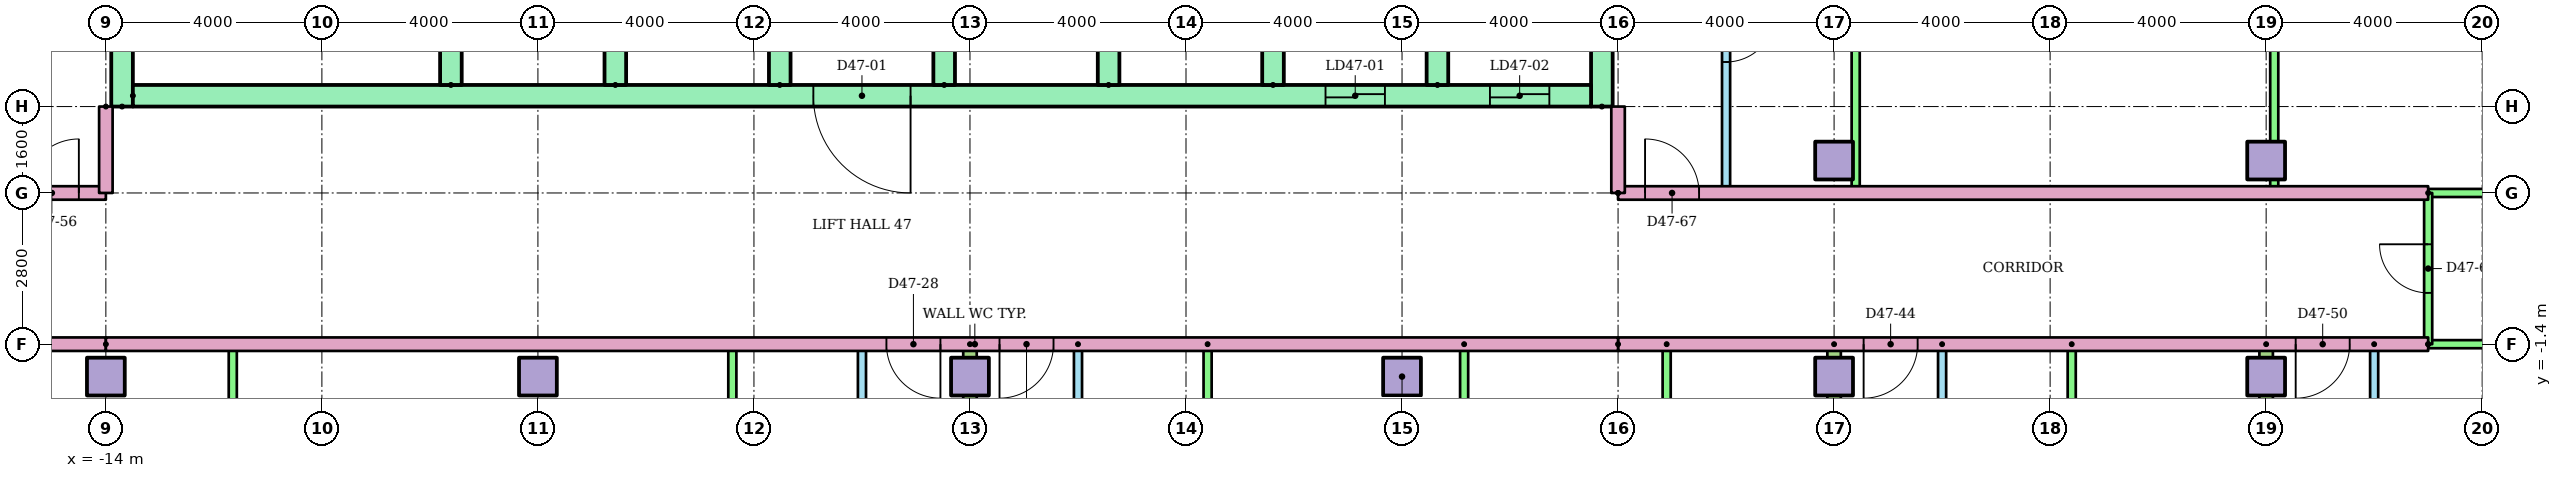
"""IFC4 building model, lengths in metres.
Left out: names, types, materials, properties, quantities, classifications, styles, units other than length and angle.
Written with IfcOpenShell. Run it as: python <this file> out.ifc"""

import sys

from ifc_helpers import new_model, si_unit, direction, frame, frame_2d, origin, origin_2d, place, context, subcontext, project, spatial, rectangle, extrude, element, fill, save


model = new_model("IFC4")
c1 = context("Model", 3, precision=1e-05, world=origin(), true_north=direction((0.0, 1.0)))
c2 = subcontext(c1, "Body", "Model", "MODEL_VIEW")
j1 = project(units=[si_unit("LENGTHUNIT", "METRE"), si_unit("PLANEANGLEUNIT", "RADIAN")], contexts=[c1])
p1 = place(None, origin())
s1 = spatial("IfcSite", under=j1, at=p1, CompositionType="ELEMENT")
p2 = place(p1, origin())
s2 = spatial("IfcBuilding", under=s1, at=p2, CompositionType="ELEMENT")
p3 = place(p2, frame((0.0, 0.0, 181.3)))
s3 = spatial("IfcBuildingStorey", under=s2, at=p3, CompositionType="ELEMENT", Elevation=181.3)
for number, where in (
    (1, (-14.0, -2.0, 0.0)),
    (2, (-6.0, -2.0, 0.0)),
    (3, (2.0, -2.0, 0.0)),
    (4, (10.0, -2.0, 0.0)),
    (5, (18.0, -2.0, 0.0)),
    (6, (26.0, -2.0, 0.0)),
    (7, (18.0, 2.0, 0.0)),
    (8, (26.0, 2.0, 0.0)),
):
    element("IfcColumn", number, at=place(p3, frame(where)), inside=s3, PredefinedType="COLUMN", context=c2, shape_type="SweptSolid", body=[
        extrude(rectangle(XDim=0.7, YDim=0.7, at=origin_2d()), origin(), (0.0, 0.0, 1.0), 3.2),
    ])
for number, where, z_axis, x_axis in (
    (9, (-13.7, 3.0, 0.0), (0.0, 0.0, 1.0), (0.0, 1.0, 0.0)),
    (10, (13.7, 3.0, 0.0), (0.0, 0.0, 1.0), (0.0, 1.0, 0.0)),
):
    element("IfcWall", number, at=place(p3, frame(where, z_axis=z_axis, x_axis=x_axis)), inside=s3, PredefinedType="SHEAR", context=c2, shape_type="SweptSolid", body=[
        extrude(rectangle(XDim=17.0, YDim=0.4, at=frame_2d((8.5, 0.0))), origin(), (0.0, 0.0, 1.0), 2.92),
    ])
p4 = place(p3, frame((-13.5, 3.2, 0.0)))
e11 = element("IfcWall", 11, at=p4, inside=s3, PredefinedType="SHEAR", context=c2, shape_type="SweptSolid", body=[
    extrude(rectangle(XDim=27.0, YDim=0.4, at=frame_2d((13.5, 0.0))), origin(), (0.0, 0.0, 1.0), 2.92),
])
p5 = place(p4, frame((22.083, 0.0, 0.0)))
e12 = element("IfcOpeningElement", 12, at=p5, cuts=e11, PredefinedType="OPENING", context=c2, shape_type="SweptSolid", body=[
    extrude(rectangle(XDim=1.1, YDim=2.1, at=frame_2d((0.55, 1.05))), frame((0.0, 0.21, 0.0), z_axis=(0.0, -1.0, 0.0), x_axis=(1.0, 0.0, 0.0)), (0.0, 0.0, 1.0), 0.42),
])
p6 = place(p4, frame((25.128, 0.0, 0.0)))
e13 = element("IfcOpeningElement", 13, at=p6, cuts=e11, PredefinedType="OPENING", context=c2, shape_type="SweptSolid", body=[
    extrude(rectangle(XDim=1.1, YDim=2.1, at=frame_2d((0.55, 1.05))), frame((0.0, 0.21, 0.0), z_axis=(0.0, -1.0, 0.0), x_axis=(1.0, 0.0, 0.0)), (0.0, 0.0, 1.0), 0.42),
])
p7 = place(p4, frame((12.6, 0.0, 0.0)))
e14 = element("IfcOpeningElement", 14, at=p7, cuts=e11, PredefinedType="OPENING", context=c2, shape_type="SweptSolid", body=[
    extrude(rectangle(XDim=1.8, YDim=2.1, at=frame_2d((0.9, 1.05))), frame((0.0, 0.21, 0.0), z_axis=(0.0, -1.0, 0.0), x_axis=(1.0, 0.0, 0.0)), (0.0, 0.0, 1.0), 0.42),
])
for number, where, z_axis, x_axis in (
    (15, (-7.611, 3.4, 0.0), (0.0, 0.0, 1.0), (0.0, 1.0, 0.0)),
    (16, (-4.567, 3.4, 0.0), (0.0, 0.0, 1.0), (0.0, 1.0, 0.0)),
    (17, (-1.522, 3.4, 0.0), (0.0, 0.0, 1.0), (0.0, 1.0, 0.0)),
    (18, (1.522, 3.4, 0.0), (0.0, 0.0, 1.0), (0.0, 1.0, 0.0)),
    (19, (4.567, 3.4, 0.0), (0.0, 0.0, 1.0), (0.0, 1.0, 0.0)),
    (20, (7.611, 3.4, 0.0), (0.0, 0.0, 1.0), (0.0, 1.0, 0.0)),
    (21, (10.656, 3.4, 0.0), (0.0, 0.0, 1.0), (0.0, 1.0, 0.0)),
):
    element("IfcWall", number, at=place(p3, frame(where, z_axis=z_axis, x_axis=x_axis)), inside=s3, PredefinedType="SHEAR", context=c2, shape_type="SweptSolid", body=[
        extrude(rectangle(XDim=3.0, YDim=0.4, at=frame_2d((1.5, 0.0))), origin(), (0.0, 0.0, 1.0), 2.92),
    ])
p8 = place(p3, frame((0.0, -9.3, 0.0), z_axis=(0.0, 0.0, 1.0), x_axis=(0.0, 1.0, 0.0)))
e22 = element("IfcWall", 22, at=p8, inside=s3, PredefinedType="PARTITIONING", context=c2, shape_type="SweptSolid", body=[
    extrude(rectangle(XDim=7.9, YDim=0.15, at=frame_2d((3.95, 0.0))), origin(), (0.0, 0.0, 1.0), 2.4),
])
p9 = place(p8, frame((5.325, 0.0, 0.0)))
e23 = element("IfcOpeningElement", 23, at=p9, cuts=e22, PredefinedType="OPENING", context=c2, shape_type="SweptSolid", body=[
    extrude(rectangle(XDim=0.9, YDim=2.1, at=frame_2d((0.45, 1.05))), frame((0.0, 0.085, 0.0), z_axis=(0.0, -1.0, 0.0), x_axis=(1.0, 0.0, 0.0)), (0.0, 0.0, 1.0), 0.17),
])
p10 = place(p8, frame((1.425, 0.0, 0.0)))
e24 = element("IfcOpeningElement", 24, at=p10, cuts=e22, PredefinedType="OPENING", context=c2, shape_type="SweptSolid", body=[
    extrude(rectangle(XDim=0.8, YDim=2.1, at=frame_2d((0.4, 1.05))), frame((0.0, 0.085, 0.0), z_axis=(0.0, -1.0, 0.0), x_axis=(1.0, 0.0, 0.0)), (0.0, 0.0, 1.0), 0.17),
])
for number, where, z_axis, x_axis in (
    (25, (-2.4, -9.3, 0.0), (0.0, 0.0, 1.0), (0.0, 1.0, 0.0)),
    (26, (-11.65, -9.3, 0.0), (0.0, 0.0, 1.0), (0.0, 1.0, 0.0)),
):
    element("IfcWall", number, at=place(p3, frame(where, z_axis=z_axis, x_axis=x_axis)), inside=s3, PredefinedType="PARTITIONING", context=c2, shape_type="SweptSolid", body=[
        extrude(rectangle(XDim=7.9, YDim=0.15, at=frame_2d((3.95, 0.0))), origin(), (0.0, 0.0, 1.0), 2.4),
    ])
p11 = place(p3, frame((4.0, -1.4, 0.0), z_axis=(0.0, 0.0, 1.0), x_axis=(0.0, -1.0, 0.0)))
e27 = element("IfcWall", 27, at=p11, inside=s3, PredefinedType="PARTITIONING", context=c2, shape_type="SweptSolid", body=[
    extrude(rectangle(XDim=7.9, YDim=0.15, at=frame_2d((3.95, 0.0))), origin(), (0.0, 0.0, 1.0), 2.4),
])
p12 = place(p11, frame((1.675, 0.0, 0.0)))
e28 = element("IfcOpeningElement", 28, at=p12, cuts=e27, PredefinedType="OPENING", context=c2, shape_type="SweptSolid", body=[
    extrude(rectangle(XDim=0.9, YDim=2.1, at=frame_2d((0.45, 1.05))), frame((0.0, 0.085, 0.0), z_axis=(0.0, -1.0, 0.0), x_axis=(1.0, 0.0, 0.0)), (0.0, 0.0, 1.0), 0.17),
])
p13 = place(p11, frame((5.675, 0.0, 0.0)))
e29 = element("IfcOpeningElement", 29, at=p13, cuts=e27, PredefinedType="OPENING", context=c2, shape_type="SweptSolid", body=[
    extrude(rectangle(XDim=0.8, YDim=2.1, at=frame_2d((0.4, 1.05))), frame((0.0, 0.085, 0.0), z_axis=(0.0, -1.0, 0.0), x_axis=(1.0, 0.0, 0.0)), (0.0, 0.0, 1.0), 0.17),
])
for number, where, z_axis, x_axis in (
    (30, (6.4, -1.4, 0.0), (0.0, 0.0, 1.0), (0.0, -1.0, 0.0)),
    (31, (11.15, -1.4, 0.0), (0.0, 0.0, 1.0), (0.0, -1.0, 0.0)),
    (32, (14.9, -1.4, 0.0), (0.0, 0.0, 1.0), (0.0, -1.0, 0.0)),
):
    element("IfcWall", number, at=place(p3, frame(where, z_axis=z_axis, x_axis=x_axis)), inside=s3, PredefinedType="PARTITIONING", context=c2, shape_type="SweptSolid", body=[
        extrude(rectangle(XDim=7.9, YDim=0.15, at=frame_2d((3.95, 0.0))), origin(), (0.0, 0.0, 1.0), 2.4),
    ])
p14 = place(p3, frame((2.0, -1.4, 0.0), z_axis=(0.0, 0.0, 1.0), x_axis=(0.0, -1.0, 0.0)))
e33 = element("IfcWall", 33, at=p14, inside=s3, PredefinedType="PARTITIONING", context=c2, shape_type="SweptSolid", body=[
    extrude(rectangle(XDim=15.01, YDim=0.25, at=frame_2d((7.505, 0.0))), origin(), (0.0, 0.0, 1.0), 2.4),
])
p15 = place(p3, frame((20.0, -1.4, 0.0), z_axis=(0.0, 0.0, 1.0), x_axis=(0.0, -1.0, 0.0)))
e34 = element("IfcWall", 34, at=p15, inside=s3, PredefinedType="PARTITIONING", context=c2, shape_type="SweptSolid", body=[
    extrude(rectangle(XDim=7.9, YDim=0.15, at=frame_2d((3.95, 0.0))), origin(), (0.0, 0.0, 1.0), 2.4),
])
p16 = place(p15, frame((1.675, 0.0, 0.0)))
e35 = element("IfcOpeningElement", 35, at=p16, cuts=e34, PredefinedType="OPENING", context=c2, shape_type="SweptSolid", body=[
    extrude(rectangle(XDim=0.9, YDim=2.1, at=frame_2d((0.45, 1.05))), frame((0.0, 0.085, 0.0), z_axis=(0.0, -1.0, 0.0), x_axis=(1.0, 0.0, 0.0)), (0.0, 0.0, 1.0), 0.17),
])
p17 = place(p15, frame((5.675, 0.0, 0.0)))
e36 = element("IfcOpeningElement", 36, at=p17, cuts=e34, PredefinedType="OPENING", context=c2, shape_type="SweptSolid", body=[
    extrude(rectangle(XDim=0.8, YDim=2.1, at=frame_2d((0.4, 1.05))), frame((0.0, 0.085, 0.0), z_axis=(0.0, -1.0, 0.0), x_axis=(1.0, 0.0, 0.0)), (0.0, 0.0, 1.0), 0.17),
])
p18 = place(p3, frame((22.4, -1.4, 0.0), z_axis=(0.0, 0.0, 1.0), x_axis=(0.0, -1.0, 0.0)))
e37 = element("IfcWall", 37, at=p18, inside=s3, PredefinedType="PARTITIONING", context=c2, shape_type="SweptSolid", body=[
    extrude(rectangle(XDim=7.9, YDim=0.15, at=frame_2d((3.95, 0.0))), origin(), (0.0, 0.0, 1.0), 2.4),
])
p19 = place(p3, frame((18.0, -1.4, 0.0), z_axis=(0.0, 0.0, 1.0), x_axis=(0.0, -1.0, 0.0)))
e38 = element("IfcWall", 38, at=p19, inside=s3, PredefinedType="PARTITIONING", context=c2, shape_type="SweptSolid", body=[
    extrude(rectangle(XDim=15.01, YDim=0.25, at=frame_2d((7.505, 0.0))), origin(), (0.0, 0.0, 1.0), 2.4),
])
p20 = place(p3, frame((28.0, -1.4, 0.0), z_axis=(0.0, 0.0, 1.0), x_axis=(0.0, -1.0, 0.0)))
e39 = element("IfcWall", 39, at=p20, inside=s3, PredefinedType="PARTITIONING", context=c2, shape_type="SweptSolid", body=[
    extrude(rectangle(XDim=7.9, YDim=0.15, at=frame_2d((3.95, 0.0))), origin(), (0.0, 0.0, 1.0), 2.4),
])
p21 = place(p20, frame((1.675, 0.0, 0.0)))
e40 = element("IfcOpeningElement", 40, at=p21, cuts=e39, PredefinedType="OPENING", context=c2, shape_type="SweptSolid", body=[
    extrude(rectangle(XDim=0.9, YDim=2.1, at=frame_2d((0.45, 1.05))), frame((0.0, 0.085, 0.0), z_axis=(0.0, -1.0, 0.0), x_axis=(1.0, 0.0, 0.0)), (0.0, 0.0, 1.0), 0.17),
])
p22 = place(p20, frame((5.675, 0.0, 0.0)))
e41 = element("IfcOpeningElement", 41, at=p22, cuts=e39, PredefinedType="OPENING", context=c2, shape_type="SweptSolid", body=[
    extrude(rectangle(XDim=0.8, YDim=2.1, at=frame_2d((0.4, 1.05))), frame((0.0, 0.085, 0.0), z_axis=(0.0, -1.0, 0.0), x_axis=(1.0, 0.0, 0.0)), (0.0, 0.0, 1.0), 0.17),
])
p23 = place(p3, frame((26.0, -1.4, 0.0), z_axis=(0.0, 0.0, 1.0), x_axis=(0.0, -1.0, 0.0)))
e42 = element("IfcWall", 42, at=p23, inside=s3, PredefinedType="PARTITIONING", context=c2, shape_type="SweptSolid", body=[
    extrude(rectangle(XDim=15.01, YDim=0.25, at=frame_2d((7.505, 0.0))), origin(), (0.0, 0.0, 1.0), 2.4),
])
p24 = place(p3, frame((-14.0, -1.4, 0.0), z_axis=(0.0, 0.0, 1.0), x_axis=(-1.0, 0.0, 0.0)))
e43 = element("IfcWall", 43, at=p24, inside=s3, PredefinedType="PARTITIONING", context=c2, shape_type="SweptSolid", body=[
    extrude(rectangle(XDim=10.82, YDim=0.25, at=frame_2d((5.41, 0.0))), origin(), (0.0, 0.0, 1.0), 2.4),
])
p25 = place(p3, frame((29.0, -1.4, 0.0), z_axis=(0.0, 0.0, 1.0), x_axis=(-1.0, 0.0, 0.0)))
e44 = element("IfcWall", 44, at=p25, inside=s3, PredefinedType="PARTITIONING", context=c2, shape_type="SweptSolid", body=[
    extrude(rectangle(XDim=15.0, YDim=0.25, at=frame_2d((7.5, 0.0))), origin(), (0.0, 0.0, 1.0), 2.4),
])
p26 = place(p25, frame((9.453, 0.0, 0.0)))
e45 = element("IfcOpeningElement", 45, at=p26, cuts=e44, PredefinedType="OPENING", context=c2, shape_type="SweptSolid", body=[
    extrude(rectangle(XDim=1.0, YDim=2.1, at=frame_2d((0.5, 1.05))), frame((0.0, 0.135, 0.0), z_axis=(0.0, -1.0, 0.0), x_axis=(1.0, 0.0, 0.0)), (0.0, 0.0, 1.0), 0.27),
])
p27 = place(p25, frame((1.453, 0.0, 0.0)))
e46 = element("IfcOpeningElement", 46, at=p27, cuts=e44, PredefinedType="OPENING", context=c2, shape_type="SweptSolid", body=[
    extrude(rectangle(XDim=1.0, YDim=2.1, at=frame_2d((0.5, 1.05))), frame((0.0, 0.135, 0.0), z_axis=(0.0, -1.0, 0.0), x_axis=(1.0, 0.0, 0.0)), (0.0, 0.0, 1.0), 0.27),
])
p28 = place(p3, frame((36.82, -1.4, 0.0), z_axis=(0.0, 0.0, 1.0), x_axis=(-1.0, 0.0, 0.0)))
e47 = element("IfcWall", 47, at=p28, inside=s3, PredefinedType="PARTITIONING", context=c2, shape_type="SweptSolid", body=[
    extrude(rectangle(XDim=7.82, YDim=0.15, at=frame_2d((3.91, 0.0))), origin(), (0.0, 0.0, 1.0), 2.4),
])
p29 = place(p3, frame((-24.82, 1.4, 0.0)))
e48 = element("IfcWall", 48, at=p29, inside=s3, PredefinedType="PARTITIONING", context=c2, shape_type="SweptSolid", body=[
    extrude(rectangle(XDim=10.82, YDim=0.25, at=frame_2d((5.41, 0.0))), origin(), (0.0, 0.0, 1.0), 2.4),
])
p30 = place(p29, frame((9.32, 0.0, 0.0)))
e49 = element("IfcOpeningElement", 49, at=p30, cuts=e48, PredefinedType="OPENING", context=c2, shape_type="SweptSolid", body=[
    extrude(rectangle(XDim=1.0, YDim=2.1, at=frame_2d((0.5, 1.05))), frame((0.0, 0.135, 0.0), z_axis=(0.0, -1.0, 0.0), x_axis=(1.0, 0.0, 0.0)), (0.0, 0.0, 1.0), 0.27),
])
p31 = place(p3, frame((16.0, 11.7, 0.0), z_axis=(0.0, 0.0, 1.0), x_axis=(0.0, -1.0, 0.0)))
e50 = element("IfcWall", 50, at=p31, inside=s3, PredefinedType="PARTITIONING", context=c2, shape_type="SweptSolid", body=[
    extrude(rectangle(XDim=10.3, YDim=0.15, at=frame_2d((5.15, 0.0))), origin(), (0.0, 0.0, 1.0), 2.4),
])
p32 = place(p31, frame((6.975, 0.0, 0.0)))
e51 = element("IfcOpeningElement", 51, at=p32, cuts=e50, PredefinedType="OPENING", context=c2, shape_type="SweptSolid", body=[
    extrude(rectangle(XDim=0.9, YDim=2.1, at=frame_2d((0.45, 1.05))), frame((0.0, 0.085, 0.0), z_axis=(0.0, -1.0, 0.0), x_axis=(1.0, 0.0, 0.0)), (0.0, 0.0, 1.0), 0.17),
])
p33 = place(p31, frame((1.875, 0.0, 0.0)))
e52 = element("IfcOpeningElement", 52, at=p33, cuts=e50, PredefinedType="OPENING", context=c2, shape_type="SweptSolid", body=[
    extrude(rectangle(XDim=0.8, YDim=2.1, at=frame_2d((0.4, 1.05))), frame((0.0, 0.085, 0.0), z_axis=(0.0, -1.0, 0.0), x_axis=(1.0, 0.0, 0.0)), (0.0, 0.0, 1.0), 0.17),
])
for number, where, z_axis, x_axis in (
    (53, (18.4, 11.7, 0.0), (0.0, 0.0, 1.0), (0.0, -1.0, 0.0)),
    (54, (26.15, 11.7, 0.0), (0.0, 0.0, 1.0), (0.0, -1.0, 0.0)),
):
    element("IfcWall", number, at=place(p3, frame(where, z_axis=z_axis, x_axis=x_axis)), inside=s3, PredefinedType="PARTITIONING", context=c2, shape_type="SweptSolid", body=[
        extrude(rectangle(XDim=10.3, YDim=0.15, at=frame_2d((5.15, 0.0))), origin(), (0.0, 0.0, 1.0), 2.4),
    ])
p34 = place(p3, frame((14.0, 1.4, 0.0)))
e55 = element("IfcWall", 55, at=p34, inside=s3, PredefinedType="PARTITIONING", context=c2, shape_type="SweptSolid", body=[
    extrude(rectangle(XDim=15.0, YDim=0.25, at=frame_2d((7.5, 0.0))), origin(), (0.0, 0.0, 1.0), 2.4),
])
p35 = place(p34, frame((0.5, 0.0, 0.0)))
e56 = element("IfcOpeningElement", 56, at=p35, cuts=e55, PredefinedType="OPENING", context=c2, shape_type="SweptSolid", body=[
    extrude(rectangle(XDim=1.0, YDim=2.1, at=frame_2d((0.5, 1.05))), frame((0.0, 0.135, 0.0), z_axis=(0.0, -1.0, 0.0), x_axis=(1.0, 0.0, 0.0)), (0.0, 0.0, 1.0), 0.27),
])
p36 = place(p3, frame((29.0, 1.4, 0.0)))
e57 = element("IfcWall", 57, at=p36, inside=s3, PredefinedType="PARTITIONING", context=c2, shape_type="SweptSolid", body=[
    extrude(rectangle(XDim=7.82, YDim=0.15, at=frame_2d((3.91, 0.0))), origin(), (0.0, 0.0, 1.0), 2.4),
])
p37 = place(p3, frame((29.0, -1.4, 0.0), z_axis=(0.0, 0.0, 1.0), x_axis=(0.0, 1.0, 0.0)))
e58 = element("IfcWall", 58, at=p37, inside=s3, PredefinedType="PARTITIONING", context=c2, shape_type="SweptSolid", body=[
    extrude(rectangle(XDim=2.8, YDim=0.15, at=frame_2d((1.4, 0.0))), origin(), (0.0, 0.0, 1.0), 2.4),
])
p38 = place(p37, frame((0.95, 0.0, 0.0)))
e59 = element("IfcOpeningElement", 59, at=p38, cuts=e58, PredefinedType="OPENING", context=c2, shape_type="SweptSolid", body=[
    extrude(rectangle(XDim=0.9, YDim=2.1, at=frame_2d((0.45, 1.05))), frame((0.0, 0.085, 0.0), z_axis=(0.0, -1.0, 0.0), x_axis=(1.0, 0.0, 0.0)), (0.0, 0.0, 1.0), 0.17),
])
p39 = place(p3, frame((14.0, -1.4, 0.0), z_axis=(0.0, 0.0, 1.0), x_axis=(-1.0, 0.0, 0.0)))
e60 = element("IfcWall", 60, at=p39, inside=s3, PredefinedType="PARTITIONING", context=c2, shape_type="SweptSolid", body=[
    extrude(rectangle(XDim=28.0, YDim=0.25, at=frame_2d((14.0, 0.0))), origin(), (0.0, 0.0, 1.0), 2.4),
])
p40 = place(p39, frame((12.547, 0.0, 0.0)))
e61 = element("IfcOpeningElement", 61, at=p40, cuts=e60, PredefinedType="OPENING", context=c2, shape_type="SweptSolid", body=[
    extrude(rectangle(XDim=1.0, YDim=2.1, at=frame_2d((0.5, 1.05))), frame((0.0, 0.135, 0.0), z_axis=(0.0, -1.0, 0.0), x_axis=(1.0, 0.0, 0.0)), (0.0, 0.0, 1.0), 0.27),
])
p41 = place(p39, frame((10.453, 0.0, 0.0)))
e62 = element("IfcOpeningElement", 62, at=p41, cuts=e60, PredefinedType="OPENING", context=c2, shape_type="SweptSolid", body=[
    extrude(rectangle(XDim=1.0, YDim=2.1, at=frame_2d((0.5, 1.05))), frame((0.0, 0.135, 0.0), z_axis=(0.0, -1.0, 0.0), x_axis=(1.0, 0.0, 0.0)), (0.0, 0.0, 1.0), 0.27),
])
for number, where, z_axis, x_axis in (
    (63, (-14.0, 3.0, 0.0), (0.0, 0.0, 1.0), (0.0, -1.0, 0.0)),
    (64, (14.0, 1.4, 0.0), (0.0, 0.0, 1.0), (0.0, 1.0, 0.0)),
):
    element("IfcWall", number, at=place(p3, frame(where, z_axis=z_axis, x_axis=x_axis)), inside=s3, PredefinedType="PARTITIONING", context=c2, shape_type="SweptSolid", body=[
        extrude(rectangle(XDim=1.6, YDim=0.25, at=frame_2d((0.8, 0.0))), origin(), (0.0, 0.0, 1.0), 2.4),
    ])
p42 = place(p5, origin())
e65 = element("IfcDoor", 65, at=p42, inside=s3, OperationType="SLIDING_TO_LEFT", PredefinedType="DOOR", context=c2, shape_type="SweptSolid", body=[
    extrude(rectangle(XDim=1.1, YDim=2.1, at=frame_2d((0.55, 1.05))), frame((0.0, 0.025, 0.0), z_axis=(0.0, -1.0, 0.0), x_axis=(1.0, 0.0, 0.0)), (0.0, 0.0, 1.0), 0.05),
])
fill(e12, e65)
p43 = place(p6, origin())
e66 = element("IfcDoor", 66, at=p43, inside=s3, OperationType="SLIDING_TO_LEFT", PredefinedType="DOOR", context=c2, shape_type="SweptSolid", body=[
    extrude(rectangle(XDim=1.1, YDim=2.1, at=frame_2d((0.55, 1.05))), frame((0.0, 0.025, 0.0), z_axis=(0.0, -1.0, 0.0), x_axis=(1.0, 0.0, 0.0)), (0.0, 0.0, 1.0), 0.05),
])
fill(e13, e66)
p44 = place(p7, frame((1.8, 0.0, 0.0), z_axis=(0.0, 0.0, 1.0), x_axis=(-1.0, 0.0, 0.0)))
e67 = element("IfcDoor", 67, at=p44, inside=s3, OperationType="DOUBLE_DOOR_SINGLE_SWING", PredefinedType="DOOR", context=c2, shape_type="SweptSolid", body=[
    extrude(rectangle(XDim=1.8, YDim=2.1, at=frame_2d((0.9, 1.05))), frame((0.0, 0.025, 0.0), z_axis=(0.0, -1.0, 0.0), x_axis=(1.0, 0.0, 0.0)), (0.0, 0.0, 1.0), 0.05),
])
fill(e14, e67)
p45 = place(p40, origin())
e68 = element("IfcDoor", 68, at=p45, inside=s3, OperationType="SINGLE_SWING_LEFT", PredefinedType="DOOR", context=c2, shape_type="SweptSolid", body=[
    extrude(rectangle(XDim=1.0, YDim=2.1, at=frame_2d((0.5, 1.05))), frame((0.0, 0.025, 0.0), z_axis=(0.0, -1.0, 0.0), x_axis=(1.0, 0.0, 0.0)), (0.0, 0.0, 1.0), 0.05),
])
fill(e61, e68)
p46 = place(p41, origin())
e69 = element("IfcDoor", 69, at=p46, inside=s3, OperationType="SINGLE_SWING_RIGHT", PredefinedType="DOOR", context=c2, shape_type="SweptSolid", body=[
    extrude(rectangle(XDim=1.0, YDim=2.1, at=frame_2d((0.5, 1.05))), frame((0.0, 0.025, 0.0), z_axis=(0.0, -1.0, 0.0), x_axis=(1.0, 0.0, 0.0)), (0.0, 0.0, 1.0), 0.05),
])
fill(e62, e69)
p47 = place(p26, origin())
e70 = element("IfcDoor", 70, at=p47, inside=s3, OperationType="SINGLE_SWING_RIGHT", PredefinedType="DOOR", context=c2, shape_type="SweptSolid", body=[
    extrude(rectangle(XDim=1.0, YDim=2.1, at=frame_2d((0.5, 1.05))), frame((0.0, 0.025, 0.0), z_axis=(0.0, -1.0, 0.0), x_axis=(1.0, 0.0, 0.0)), (0.0, 0.0, 1.0), 0.05),
])
fill(e45, e70)
p48 = place(p27, origin())
e71 = element("IfcDoor", 71, at=p48, inside=s3, OperationType="SINGLE_SWING_RIGHT", PredefinedType="DOOR", context=c2, shape_type="SweptSolid", body=[
    extrude(rectangle(XDim=1.0, YDim=2.1, at=frame_2d((0.5, 1.05))), frame((0.0, 0.025, 0.0), z_axis=(0.0, -1.0, 0.0), x_axis=(1.0, 0.0, 0.0)), (0.0, 0.0, 1.0), 0.05),
])
fill(e46, e71)
p49 = place(p30, origin())
e72 = element("IfcDoor", 72, at=p49, inside=s3, OperationType="SINGLE_SWING_RIGHT", PredefinedType="DOOR", context=c2, shape_type="SweptSolid", body=[
    extrude(rectangle(XDim=1.0, YDim=2.1, at=frame_2d((0.5, 1.05))), frame((0.0, 0.025, 0.0), z_axis=(0.0, -1.0, 0.0), x_axis=(1.0, 0.0, 0.0)), (0.0, 0.0, 1.0), 0.05),
])
fill(e49, e72)
p50 = place(p32, origin())
e73 = element("IfcDoor", 73, at=p50, inside=s3, OperationType="SINGLE_SWING_LEFT", PredefinedType="DOOR", context=c2, shape_type="SweptSolid", body=[
    extrude(rectangle(XDim=0.9, YDim=2.1, at=frame_2d((0.45, 1.05))), frame((0.0, 0.025, 0.0), z_axis=(0.0, -1.0, 0.0), x_axis=(1.0, 0.0, 0.0)), (0.0, 0.0, 1.0), 0.05),
])
fill(e51, e73)
p51 = place(p35, origin())
e74 = element("IfcDoor", 74, at=p51, inside=s3, OperationType="SINGLE_SWING_LEFT", PredefinedType="DOOR", context=c2, shape_type="SweptSolid", body=[
    extrude(rectangle(XDim=1.0, YDim=2.1, at=frame_2d((0.5, 1.05))), frame((0.0, 0.025, 0.0), z_axis=(0.0, -1.0, 0.0), x_axis=(1.0, 0.0, 0.0)), (0.0, 0.0, 1.0), 0.05),
])
fill(e56, e74)
p52 = place(p38, origin())
e75 = element("IfcDoor", 75, at=p52, inside=s3, OperationType="SINGLE_SWING_RIGHT", PredefinedType="DOOR", context=c2, shape_type="SweptSolid", body=[
    extrude(rectangle(XDim=0.9, YDim=2.1, at=frame_2d((0.45, 1.05))), frame((0.0, 0.025, 0.0), z_axis=(0.0, -1.0, 0.0), x_axis=(1.0, 0.0, 0.0)), (0.0, 0.0, 1.0), 0.05),
])
fill(e59, e75)
save(model, sys.argv[1])
